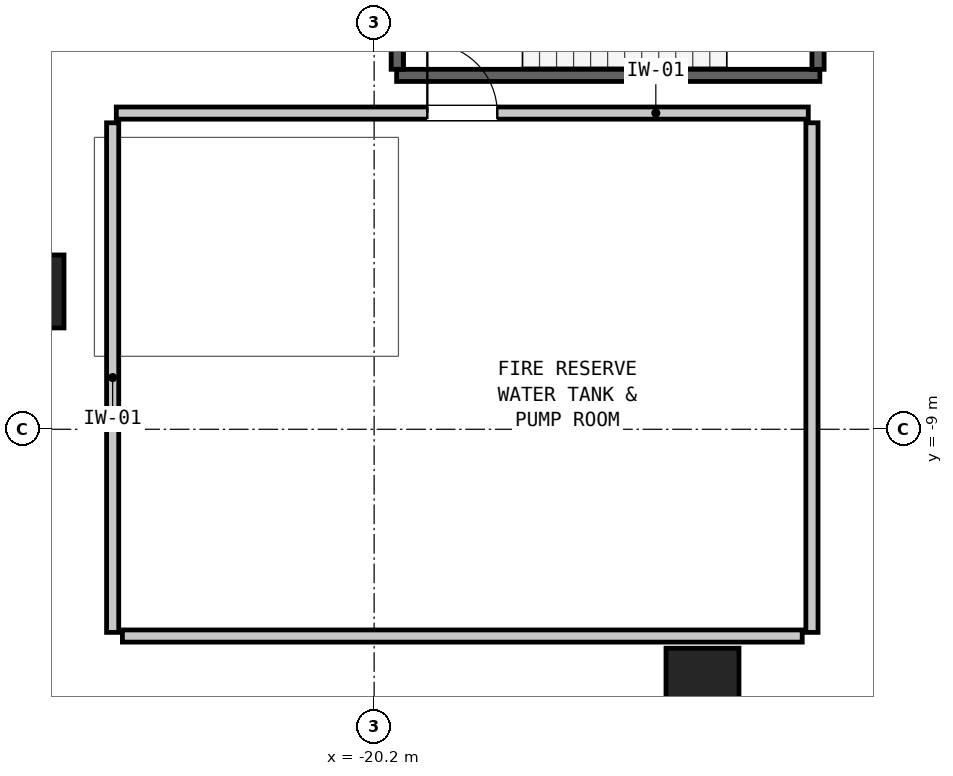
"""IFC4 building model, lengths in metres.
Left out: names, types, materials, properties, quantities, classifications, styles, units other than length and angle.
Written with IfcOpenShell. Run it as: python <this file> out.ifc"""

import sys

from ifc_helpers import new_model, si_unit, direction, frame, frame_2d, origin, origin_2d, place, context, subcontext, project, spatial, rectangle, extrude, element, fill, save


model = new_model("IFC4")
c1 = context("Model", 3, precision=1e-05, world=origin(), true_north=direction((0.0, 1.0)))
c2 = subcontext(c1, "Body", "Model", "MODEL_VIEW")
j1 = project(units=[si_unit("LENGTHUNIT", "METRE"), si_unit("PLANEANGLEUNIT", "RADIAN")], contexts=[c1])
p1 = place(None, origin())
s1 = spatial("IfcSite", under=j1, at=p1, CompositionType="ELEMENT")
p2 = place(p1, origin())
s2 = spatial("IfcBuilding", under=s1, at=p2, CompositionType="ELEMENT")
p3 = place(p2, frame((0.0, 0.0, -9.0)))
s3 = spatial("IfcBuildingStorey", under=s2, at=p3, CompositionType="ELEMENT", Elevation=-9.0)
for number, where, z_axis, x_axis in (
    (1, (-14.8, -13.2, 0.0), (0.0, 0.0, 1.0), (1.0, 0.0, 0.0)),
    (2, (-25.9, -6.733, 0.0), (0.0, 0.0, 1.0), (0.0, 1.0, 0.0)),
):
    element("IfcColumn", number, at=place(p3, frame(where, z_axis=z_axis, x_axis=x_axis)), inside=s3, PredefinedType="COLUMN", context=c2, shape_type="SweptSolid", body=[
        extrude(rectangle(XDim=1.2, YDim=1.2, at=origin_2d()), origin(), (0.0, 0.0, 1.0), 4.5),
    ])
p4 = place(p3, frame((-19.83, -3.18, 0.0), z_axis=(0.0, 0.0, 1.0), x_axis=(1.0, 0.0, 0.0)))
e3 = element("IfcWall", 3, at=p4, inside=s3, PredefinedType="SHEAR", context=c2, shape_type="SweptSolid", body=[
    extrude(rectangle(XDim=6.96, YDim=0.2, at=frame_2d((3.48, 0.0))), origin(), (0.0, 0.0, 1.0), 4.18),
])
p5 = place(p3, frame((-12.9, -0.34, 0.0), z_axis=(0.0, 0.0, 1.0), x_axis=(0.0, -1.0, 0.0)))
e4 = element("IfcWall", 4, at=p5, inside=s3, PredefinedType="SHEAR", context=c2, shape_type="SweptSolid", body=[
    extrude(rectangle(XDim=2.74, YDim=0.2, at=frame_2d((1.37, 0.0))), origin(), (0.0, 0.0, 1.0), 4.18),
])
p6 = place(p5, frame((0.895, 0.0, 0.0)))
e5 = element("IfcOpeningElement", 5, at=p6, cuts=e4, PredefinedType="OPENING", context=c2, shape_type="SweptSolid", body=[
    extrude(rectangle(XDim=1.05, YDim=2.08, at=frame_2d((0.525, 1.04))), frame((0.0, 0.112, 0.0), z_axis=(0.0, -1.0, 0.0), x_axis=(1.0, 0.0, 0.0)), (0.0, 0.0, 1.0), 0.224),
])
p7 = place(p3, frame((-19.82, -3.08, 0.0), z_axis=(0.0, 0.0, 1.0), x_axis=(0.0, 1.0, 0.0)))
e6 = element("IfcWall", 6, at=p7, inside=s3, PredefinedType="SHEAR", context=c2, shape_type="SweptSolid", body=[
    extrude(rectangle(XDim=2.74, YDim=0.2, at=frame_2d((1.37, 0.0))), origin(), (0.0, 0.0, 1.0), 4.18),
])
p8 = place(p3, frame((-24.44, -3.8, 0.0), z_axis=(0.0, 0.0, 1.0), x_axis=(1.0, 0.0, 0.0)))
e7 = element("IfcWall", 7, at=p8, inside=s3, PredefinedType="PARTITIONING", context=c2, shape_type="SweptSolid", body=[
    extrude(rectangle(XDim=11.38, YDim=0.2, at=frame_2d((5.69, 0.0))), origin(), (0.0, 0.0, 1.0), 4.18),
])
p9 = place(p8, frame((5.115, 0.0, 0.0)))
e8 = element("IfcOpeningElement", 8, at=p9, cuts=e7, PredefinedType="OPENING", context=c2, shape_type="SweptSolid", body=[
    extrude(rectangle(XDim=1.15, YDim=2.1, at=frame_2d((0.575, 1.05))), frame((0.0, 0.112, 0.0), z_axis=(0.0, -1.0, 0.0), x_axis=(1.0, 0.0, 0.0)), (0.0, 0.0, 1.0), 0.224),
])
for number, where, z_axis, x_axis in (
    (9, (-24.5, -12.34, 0.0), (0.0, 0.0, 1.0), (0.0, 1.0, 0.0)),
    (10, (-13.0, -12.34, 0.0), (0.0, 0.0, 1.0), (0.0, 1.0, 0.0)),
):
    element("IfcWall", number, at=place(p3, frame(where, z_axis=z_axis, x_axis=x_axis)), inside=s3, PredefinedType="PARTITIONING", context=c2, shape_type="SweptSolid", body=[
        extrude(rectangle(XDim=8.38, YDim=0.2, at=frame_2d((4.19, 0.0))), origin(), (0.0, 0.0, 1.0), 4.18),
    ])
p10 = place(p3, frame((-24.34, -12.4, 0.0), z_axis=(0.0, 0.0, 1.0), x_axis=(1.0, 0.0, 0.0)))
e11 = element("IfcWall", 11, at=p10, inside=s3, PredefinedType="PARTITIONING", context=c2, shape_type="SweptSolid", body=[
    extrude(rectangle(XDim=11.18, YDim=0.2, at=frame_2d((5.59, 0.0))), origin(), (0.0, 0.0, 1.0), 4.18),
])
p11 = place(p9, origin())
e12 = element("IfcDoor", 12, at=p11, inside=s3, OperationType="SINGLE_SWING_LEFT", PredefinedType="DOOR", context=c2, shape_type="SweptSolid", body=[
    extrude(rectangle(XDim=1.15, YDim=2.1, at=frame_2d((0.575, 1.05))), frame((0.0, 0.025, 0.0), z_axis=(0.0, -1.0, 0.0), x_axis=(1.0, 0.0, 0.0)), (0.0, 0.0, 1.0), 0.05),
])
fill(e8, e12)
save(model, sys.argv[1])
